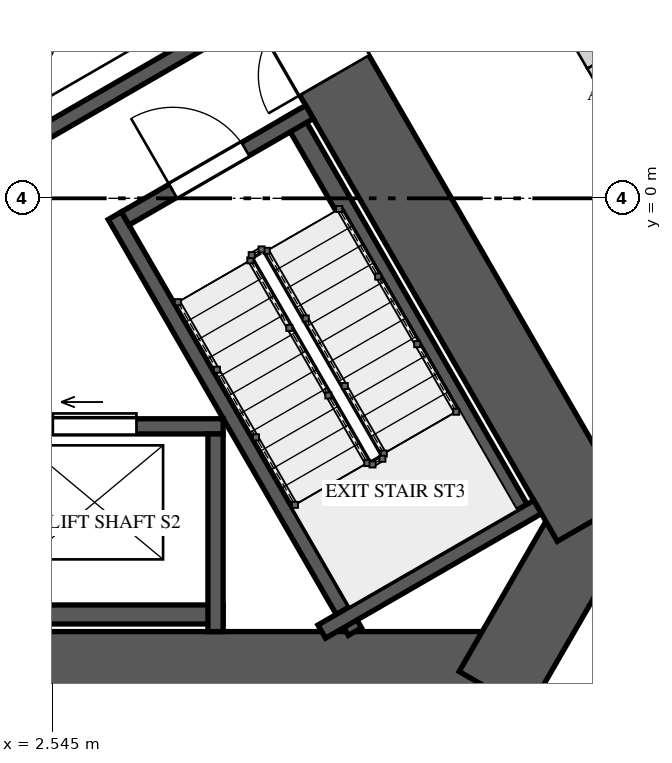
"""IFC4 building model, lengths in metres.
Left out: names, types, materials, properties, quantities, classifications, styles, units other than length and angle.
Written with IfcOpenShell. Run it as: python <this file> out.ifc"""

import sys

from ifc_helpers import new_model, si_unit, direction, frame, frame_2d, origin, place, context, subcontext, project, spatial, rectangle, extrude, element, fill, save


model = new_model("IFC4")
c1 = context("Model", 3, precision=1e-05, world=origin(), true_north=direction((0.0, 1.0)))
c2 = subcontext(c1, "Body", "Model", "MODEL_VIEW")
j1 = project(units=[si_unit("LENGTHUNIT", "METRE"), si_unit("PLANEANGLEUNIT", "RADIAN")], contexts=[c1])
p1 = place(None, origin())
s1 = spatial("IfcSite", under=j1, at=p1, CompositionType="ELEMENT")
p2 = place(p1, origin())
s2 = spatial("IfcBuilding", under=s1, at=p2, CompositionType="ELEMENT")
p3 = place(p2, frame((0.0, 0.0, 51.2)))
s3 = spatial("IfcBuildingStorey", under=s2, at=p3, CompositionType="ELEMENT", Elevation=51.2)
p4 = place(p3, frame((-8.501, -6.225, 0.0), z_axis=(0.0, 0.0, 1.0), x_axis=(1.0, 0.0, 0.0)))
e1 = element("IfcWall", 1, at=p4, inside=s3, PredefinedType="SHEAR", context=c2, shape_type="SweptSolid", body=[
    extrude(rectangle(XDim=17.003, YDim=1.05, at=frame_2d((8.501, 0.0))), origin(), (0.0, 0.0, 1.0), 4.0),
])
p5 = place(p4, frame((6.707, 0.0, 0.0)))
e2 = element("IfcOpeningElement", 2, at=p5, cuts=e1, PredefinedType="OPENING", context=c2, shape_type="SweptSolid", body=[
    extrude(rectangle(XDim=1.0, YDim=2.4, at=frame_2d((0.5, 1.2))), frame((0.0, 0.535, 0.0), z_axis=(0.0, -1.0, 0.0), x_axis=(1.0, 0.0, 0.0)), (0.0, 0.0, 1.0), 1.07),
])
p6 = place(p3, frame((8.35, -6.488, 0.0), z_axis=(0.0, 0.0, 1.0), x_axis=(0.499995765644, 0.866027848477, 0.0)))
e3 = element("IfcWall", 3, at=p6, inside=s3, PredefinedType="SHEAR", context=c2, shape_type="SweptSolid", body=[
    extrude(rectangle(XDim=2.887, YDim=1.05, at=frame_2d((1.443, 0.0))), origin(), (0.0, 0.0, 1.0), 4.0),
])
p7 = place(p3, frame((9.642, -4.25, 0.0), z_axis=(0.0, 0.0, 1.0), x_axis=(-0.499985955615, 0.866033512162, 0.0)))
e4 = element("IfcWall", 4, at=p7, inside=s3, PredefinedType="SHEAR", context=c2, shape_type="SweptSolid", body=[
    extrude(rectangle(XDim=17.003, YDim=1.05, at=frame_2d((8.501, 0.0))), origin(), (0.0, 0.0, 1.0), 4.0),
])
p8 = place(p7, frame((6.776, 0.0, 0.0)))
e5 = element("IfcOpeningElement", 5, at=p8, cuts=e4, PredefinedType="OPENING", context=c2, shape_type="SweptSolid", body=[
    extrude(rectangle(XDim=1.0, YDim=2.4, at=frame_2d((0.5, 1.2))), frame((0.0, 0.535, 0.0), z_axis=(0.0, -1.0, 0.0), x_axis=(1.0, 0.0, 0.0)), (0.0, 0.0, 1.0), 1.07),
])
p9 = place(p3, frame((8.781, -4.26, 0.0), z_axis=(0.0, 0.0, 1.0), x_axis=(-0.500009909098, 0.866019682689, 0.0)))
e6 = element("IfcWall", 6, at=p9, inside=s3, PredefinedType="SOLIDWALL", context=c2, shape_type="SweptSolid", body=[
    extrude(rectangle(XDim=6.2, YDim=0.25, at=frame_2d((3.1, 0.0))), origin(), (0.0, 0.0, 1.0), 3.65),
])
p10 = place(p3, frame((6.524, -5.7, 0.0), z_axis=(0.0, 0.0, 1.0), x_axis=(-0.499995607161, 0.866027939976, 0.0)))
e7 = element("IfcWall", 7, at=p10, inside=s3, PredefinedType="SOLIDWALL", context=c2, shape_type="SweptSolid", body=[
    extrude(rectangle(XDim=6.318, YDim=0.2, at=frame_2d((3.159, 0.0))), origin(), (0.0, 0.0, 1.0), 3.65),
])
p11 = place(p3, frame((6.087, -5.7, 0.0), z_axis=(0.0, 0.0, 1.0), x_axis=(0.866006986733, 0.500031897912, 0.0)))
e8 = element("IfcWall", 8, at=p11, inside=s3, PredefinedType="SOLIDWALL", context=c2, shape_type="SweptSolid", body=[
    extrude(rectangle(XDim=3.278, YDim=0.2, at=frame_2d((1.639, 0.0))), origin(), (0.0, 0.0, 1.0), 3.65),
])
p12 = place(p3, frame((3.501, -0.265, 0.0), z_axis=(0.0, 0.0, 1.0), x_axis=(0.866034573852, 0.49998411664, 0.0)))
e9 = element("IfcWall", 9, at=p12, inside=s3, PredefinedType="SOLIDWALL", context=c2, shape_type="SweptSolid", body=[
    extrude(rectangle(XDim=2.8, YDim=0.2, at=frame_2d((1.4, 0.0))), origin(), (0.0, 0.0, 1.0), 3.65),
])
p13 = place(p12, frame((0.725, 0.0, 0.0)))
e10 = element("IfcOpeningElement", 10, at=p13, cuts=e9, PredefinedType="OPENING", context=c2, shape_type="SweptSolid", body=[
    extrude(rectangle(XDim=1.1, YDim=2.4, at=frame_2d((0.55, 1.2))), frame((0.0, 0.11, 0.0), z_axis=(0.0, -1.0, 0.0), x_axis=(1.0, 0.0, 0.0)), (0.0, 0.0, 1.0), 0.22),
])
p14 = place(p3, frame((-0.71, -3.0, 0.0), z_axis=(0.0, 0.0, 1.0), x_axis=(1.0, 0.0, 0.0)))
e11 = element("IfcWall", 11, at=p14, inside=s3, PredefinedType="SOLIDWALL", context=c2, shape_type="SweptSolid", body=[
    extrude(rectangle(XDim=5.5, YDim=0.2, at=frame_2d((2.75, 0.0))), origin(), (0.0, 0.0, 1.0), 3.65),
])
p15 = place(p14, frame((0.61, 0.0, 0.0)))
e12 = element("IfcOpeningElement", 12, at=p15, cuts=e11, PredefinedType="OPENING", context=c2, shape_type="SweptSolid", body=[
    extrude(rectangle(XDim=1.1, YDim=2.1, at=frame_2d((0.55, 1.05))), frame((0.0, 0.11, 0.0), z_axis=(0.0, -1.0, 0.0), x_axis=(1.0, 0.0, 0.0)), (0.0, 0.0, 1.0), 0.22),
])
p16 = place(p14, frame((3.26, 0.0, 0.0)))
e13 = element("IfcOpeningElement", 13, at=p16, cuts=e11, PredefinedType="OPENING", context=c2, shape_type="SweptSolid", body=[
    extrude(rectangle(XDim=1.1, YDim=2.1, at=frame_2d((0.55, 1.05))), frame((0.0, 0.11, 0.0), z_axis=(0.0, -1.0, 0.0), x_axis=(1.0, 0.0, 0.0)), (0.0, 0.0, 1.0), 0.22),
])
p17 = place(p3, frame((-0.71, -5.475, 0.0), z_axis=(0.0, 0.0, 1.0), x_axis=(1.0, 0.0, 0.0)))
e14 = element("IfcWall", 14, at=p17, inside=s3, PredefinedType="SOLIDWALL", context=c2, shape_type="SweptSolid", body=[
    extrude(rectangle(XDim=5.5, YDim=0.25, at=frame_2d((2.75, 0.0))), origin(), (0.0, 0.0, 1.0), 3.65),
])
p18 = place(p3, frame((4.69, -3.1, 0.0), z_axis=(0.0, 0.0, 1.0), x_axis=(0.0, -1.0, 0.0)))
e15 = element("IfcWall", 15, at=p18, inside=s3, PredefinedType="SOLIDWALL", context=c2, shape_type="SweptSolid", body=[
    extrude(rectangle(XDim=2.6, YDim=0.2, at=frame_2d((1.3, 0.0))), origin(), (0.0, 0.0, 1.0), 3.65),
])
p19 = place(p3, frame((2.227, 0.743, 0.0), z_axis=(0.0, 0.0, 1.0), x_axis=(0.866038511948, 0.499977295307, 0.0)))
e16 = element("IfcWall", 16, at=p19, inside=s3, PredefinedType="SOLIDWALL", context=c2, shape_type="SweptSolid", body=[
    extrude(rectangle(XDim=3.4, YDim=0.2, at=frame_2d((1.7, 0.0))), origin(), (0.0, 0.0, 1.0), 3.65),
])
p20 = place(p3, frame((9.248, 2.482, 0.0), z_axis=(0.0, 0.0, 1.0), x_axis=(0.500117447933, -0.865957584569, 0.0)))
e17 = element("IfcWall", 17, at=p20, inside=s3, PredefinedType="SOLIDWALL", context=c2, shape_type="SweptSolid", body=[
    extrude(rectangle(XDim=0.838, YDim=0.2, at=frame_2d((0.419, 0.0))), origin(), (0.0, 0.0, 1.0), 2.75),
])
p21 = place(p3, frame((9.667, 1.756, 0.0), z_axis=(0.0, 0.0, 1.0), x_axis=(0.499964529649, -0.866045881633, 0.0)))
e18 = element("IfcWall", 18, at=p21, inside=s3, PredefinedType="SOLIDWALL", context=c2, shape_type="SweptSolid", body=[
    extrude(rectangle(XDim=2.794, YDim=0.2, at=frame_2d((1.397, 0.0))), origin(), (0.0, 0.0, 1.0), 3.65),
])
p22 = place(p13, origin())
e19 = element("IfcDoor", 19, at=p22, inside=s3, OperationType="SINGLE_SWING_RIGHT", PredefinedType="DOOR", context=c2, shape_type="SweptSolid", body=[
    extrude(rectangle(XDim=1.1, YDim=2.4, at=frame_2d((0.55, 1.2))), frame((0.0, 0.025, 0.0), z_axis=(0.0, -1.0, 0.0), x_axis=(1.0, 0.0, 0.0)), (0.0, 0.0, 1.0), 0.05),
])
fill(e10, e19)
p23 = place(p16, origin())
e20 = element("IfcDoor", 20, at=p23, inside=s3, OperationType="SLIDING_TO_LEFT", PredefinedType="DOOR", context=c2, shape_type="SweptSolid", body=[
    extrude(rectangle(XDim=1.1, YDim=2.1, at=frame_2d((0.55, 1.05))), frame((0.0, 0.025, 0.0), z_axis=(0.0, -1.0, 0.0), x_axis=(1.0, 0.0, 0.0)), (0.0, 0.0, 1.0), 0.05),
])
fill(e13, e20)
p24 = place(p8, origin())
e21 = element("IfcDoor", 21, at=p24, inside=s3, OperationType="SINGLE_SWING_LEFT", PredefinedType="DOOR", context=c2, shape_type="SweptSolid", body=[
    extrude(rectangle(XDim=1.0, YDim=2.4, at=frame_2d((0.5, 1.2))), frame((0.0, 0.025, 0.0), z_axis=(0.0, -1.0, 0.0), x_axis=(1.0, 0.0, 0.0)), (0.0, 0.0, 1.0), 0.05),
])
fill(e5, e21)
save(model, sys.argv[1])
